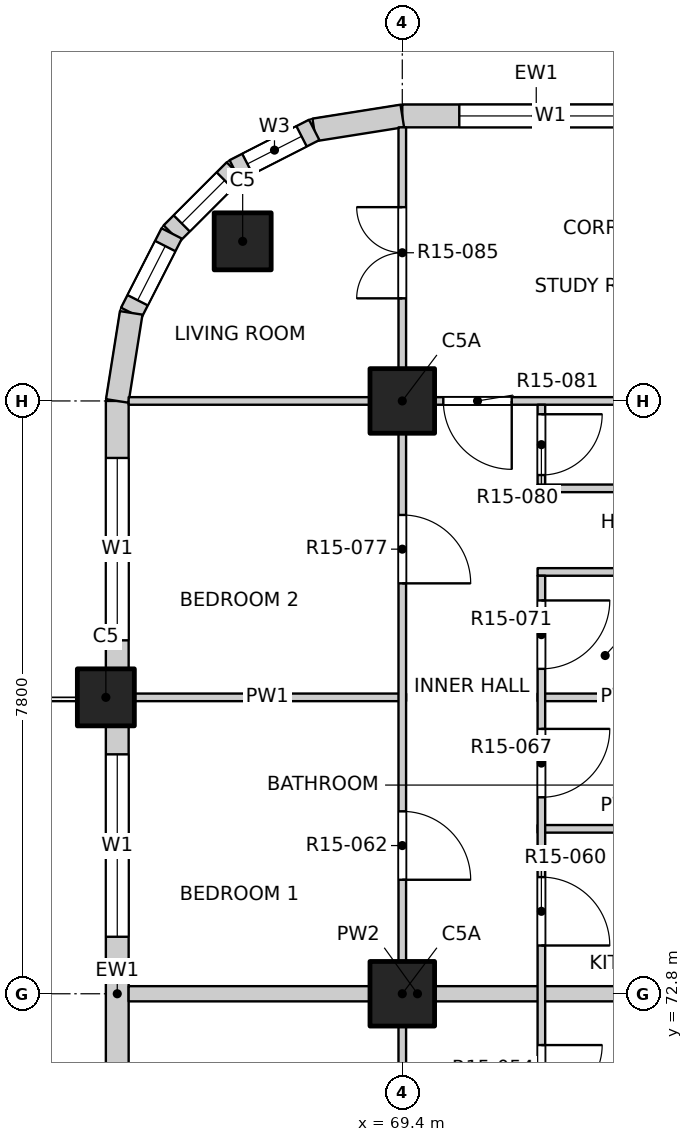
"""IFC4 building model, lengths in metres.
Left out: names, types, materials, properties, quantities, classifications, styles, units other than length and angle.
Written with IfcOpenShell. Run it as: python <this file> out.ifc"""

import sys

from ifc_helpers import new_model, si_unit, direction, frame, frame_2d, origin, origin_2d, place, context, subcontext, project, spatial, rectangle, extrude, element, fill, save


model = new_model("IFC4")
c1 = context("Model", 3, precision=1e-05, world=origin(), true_north=direction((0.0, 1.0)))
c2 = subcontext(c1, "Body", "Model", "MODEL_VIEW")
j1 = project(units=[si_unit("LENGTHUNIT", "METRE"), si_unit("PLANEANGLEUNIT", "RADIAN")], contexts=[c1])
p1 = place(None, origin())
s1 = spatial("IfcSite", under=j1, at=p1, CompositionType="ELEMENT")
p2 = place(p1, origin())
s2 = spatial("IfcBuilding", under=s1, at=p2, CompositionType="ELEMENT")
p3 = place(p2, frame((0.0, 0.0, 158.8)))
s3 = spatial("IfcBuildingStorey", under=s2, at=p3, CompositionType="ELEMENT", Elevation=158.8)
for number, where, z_axis, x_axis in (
    (1, (67.3, 82.7, -0.25), (0.0, 0.0, 1.0), (1.0, 0.0, 0.0)),
    (2, (65.5, 76.7, -0.25), (0.0, 0.0, 1.0), (1.0, 0.0, 0.0)),
):
    element("IfcColumn", number, at=place(p3, frame(where, z_axis=z_axis, x_axis=x_axis)), inside=s3, PredefinedType="COLUMN", context=c2, shape_type="SweptSolid", body=[
        extrude(rectangle(XDim=0.75, YDim=0.75, at=origin_2d()), origin(), (0.0, 0.0, 1.0), 3.4),
    ])
for number, where, z_axis, x_axis in (
    (3, (69.4, 72.8, -0.25), (0.0, 0.0, 1.0), (1.0, 0.0, 0.0)),
    (4, (69.4, 80.6, -0.25), (0.0, 0.0, 1.0), (1.0, 0.0, 0.0)),
):
    element("IfcColumn", number, at=place(p3, frame(where, z_axis=z_axis, x_axis=x_axis)), inside=s3, PredefinedType="COLUMN", context=c2, shape_type="SweptSolid", body=[
        extrude(rectangle(XDim=0.85, YDim=0.85, at=origin_2d()), origin(), (0.0, 0.0, 1.0), 3.4),
    ])
p4 = place(p3, frame((69.4, 84.35, 0.0), z_axis=(0.0, 0.0, 1.0), x_axis=(1.0, 0.0, 0.0)))
e5 = element("IfcWall", 5, at=p4, inside=s3, PredefinedType="SOLIDWALL", context=c2, shape_type="SweptSolid", body=[
    extrude(rectangle(XDim=3.525, YDim=0.3, at=frame_2d((1.763, 0.0))), origin(), (0.0, 0.0, 1.0), 2.7),
])
p5 = place(p4, frame((0.75, 0.0, 0.9)))
e6 = element("IfcOpeningElement", 6, at=p5, cuts=e5, PredefinedType="OPENING", context=c2, shape_type="SweptSolid", body=[
    extrude(rectangle(XDim=2.4, YDim=1.8, at=frame_2d((1.2, 0.9))), frame((0.0, 0.16, 0.0), z_axis=(0.0, -1.0, 0.0), x_axis=(1.0, 0.0, 0.0)), (0.0, 0.0, 1.0), 0.32),
])
p6 = place(p3, frame((65.65, 69.275, 0.0), z_axis=(0.0, 0.0, 1.0), x_axis=(0.0, 1.0, 0.0)))
e7 = element("IfcWall", 7, at=p6, inside=s3, PredefinedType="SOLIDWALL", context=c2, shape_type="SweptSolid", body=[
    extrude(rectangle(XDim=7.05, YDim=0.3, at=frame_2d((3.525, 0.0))), origin(), (0.0, 0.0, 1.0), 2.7),
])
p7 = place(p6, frame((0.675, 0.0, 0.0)))
e8 = element("IfcOpeningElement", 8, at=p7, cuts=e7, PredefinedType="OPENING", context=c2, shape_type="SweptSolid", body=[
    extrude(rectangle(XDim=1.8, YDim=2.4, at=frame_2d((0.9, 1.2))), frame((0.0, 0.16, 0.0), z_axis=(0.0, -1.0, 0.0), x_axis=(1.0, 0.0, 0.0)), (0.0, 0.0, 1.0), 0.32),
])
p8 = place(p6, frame((4.275, 0.0, 0.9)))
e9 = element("IfcOpeningElement", 9, at=p8, cuts=e7, PredefinedType="OPENING", context=c2, shape_type="SweptSolid", body=[
    extrude(rectangle(XDim=2.4, YDim=1.8, at=frame_2d((1.2, 0.9))), frame((0.0, 0.16, 0.0), z_axis=(0.0, -1.0, 0.0), x_axis=(1.0, 0.0, 0.0)), (0.0, 0.0, 1.0), 0.32),
])
p9 = place(p3, frame((65.65, 77.075, 0.0), z_axis=(0.0, 0.0, 1.0), x_axis=(0.0, 1.0, 0.0)))
e10 = element("IfcWall", 10, at=p9, inside=s3, PredefinedType="SOLIDWALL", context=c2, shape_type="SweptSolid", body=[
    extrude(rectangle(XDim=3.525, YDim=0.3, at=frame_2d((1.763, 0.0))), origin(), (0.0, 0.0, 1.0), 2.7),
])
p10 = place(p9, frame((0.375, 0.0, 0.9)))
e11 = element("IfcOpeningElement", 11, at=p10, cuts=e10, PredefinedType="OPENING", context=c2, shape_type="SweptSolid", body=[
    extrude(rectangle(XDim=2.4, YDim=1.8, at=frame_2d((1.2, 0.9))), frame((0.0, 0.16, 0.0), z_axis=(0.0, -1.0, 0.0), x_axis=(1.0, 0.0, 0.0)), (0.0, 0.0, 1.0), 0.32),
])
p11 = place(p3, frame((69.4, 84.35, 0.0), z_axis=(0.0, 0.0, 1.0), x_axis=(-0.987678452879, -0.156496880861, 0.0)))
e12 = element("IfcWall", 12, at=p11, inside=s3, PredefinedType="SOLIDWALL", context=c2, shape_type="SweptSolid", body=[
    extrude(rectangle(XDim=1.173, YDim=0.3, at=frame_2d((0.586, 0.0))), origin(), (0.0, 0.0, 1.0), 2.7),
])
p12 = place(p3, frame((68.241, 84.167, 0.0), z_axis=(0.0, 0.0, 1.0), x_axis=(-0.890988677504, -0.454025524128, 0.0)))
e13 = element("IfcWall", 13, at=p12, inside=s3, PredefinedType="SOLIDWALL", context=c2, shape_type="SweptSolid", body=[
    extrude(rectangle(XDim=1.173, YDim=0.3, at=frame_2d((0.587, 0.0))), origin(), (0.0, 0.0, 1.0), 2.7),
])
p13 = place(p12, frame((0.187, 0.0, 0.9)))
e14 = element("IfcOpeningElement", 14, at=p13, cuts=e13, PredefinedType="OPENING", context=c2, shape_type="SweptSolid", body=[
    extrude(rectangle(XDim=0.8, YDim=1.2, at=frame_2d((0.4, 0.6))), frame((0.0, 0.16, 0.0), z_axis=(0.0, -1.0, 0.0), x_axis=(1.0, 0.0, 0.0)), (0.0, 0.0, 1.0), 0.32),
])
p14 = place(p3, frame((67.196, 83.634, 0.0), z_axis=(0.0, 0.0, 1.0), x_axis=(-0.707106781187, -0.707106781187, 0.0)))
e15 = element("IfcWall", 15, at=p14, inside=s3, PredefinedType="SOLIDWALL", context=c2, shape_type="SweptSolid", body=[
    extrude(rectangle(XDim=1.173, YDim=0.3, at=frame_2d((0.586, 0.0))), origin(), (0.0, 0.0, 1.0), 2.7),
])
p15 = place(p14, frame((0.187, 0.0, 0.9)))
e16 = element("IfcOpeningElement", 16, at=p15, cuts=e15, PredefinedType="OPENING", context=c2, shape_type="SweptSolid", body=[
    extrude(rectangle(XDim=0.8, YDim=1.2, at=frame_2d((0.4, 0.6))), frame((0.0, 0.16, 0.0), z_axis=(0.0, -1.0, 0.0), x_axis=(1.0, 0.0, 0.0)), (0.0, 0.0, 1.0), 0.32),
])
p16 = place(p3, frame((66.366, 82.804, 0.0), z_axis=(0.0, 0.0, 1.0), x_axis=(-0.454025524128, -0.890988677504, 0.0)))
e17 = element("IfcWall", 17, at=p16, inside=s3, PredefinedType="SOLIDWALL", context=c2, shape_type="SweptSolid", body=[
    extrude(rectangle(XDim=1.173, YDim=0.3, at=frame_2d((0.587, 0.0))), origin(), (0.0, 0.0, 1.0), 2.7),
])
p17 = place(p16, frame((0.187, 0.0, 0.9)))
e18 = element("IfcOpeningElement", 18, at=p17, cuts=e17, PredefinedType="OPENING", context=c2, shape_type="SweptSolid", body=[
    extrude(rectangle(XDim=0.8, YDim=1.2, at=frame_2d((0.4, 0.6))), frame((0.0, 0.16, 0.0), z_axis=(0.0, -1.0, 0.0), x_axis=(1.0, 0.0, 0.0)), (0.0, 0.0, 1.0), 0.32),
])
p18 = place(p3, frame((65.833, 81.759, 0.0), z_axis=(0.0, 0.0, 1.0), x_axis=(-0.156496880861, -0.987678452879, 0.0)))
e19 = element("IfcWall", 19, at=p18, inside=s3, PredefinedType="SOLIDWALL", context=c2, shape_type="SweptSolid", body=[
    extrude(rectangle(XDim=1.173, YDim=0.3, at=frame_2d((0.586, 0.0))), origin(), (0.0, 0.0, 1.0), 2.7),
])
p19 = place(p3, frame((65.8, 72.8, 0.0), z_axis=(0.0, 0.0, 1.0), x_axis=(1.0, 0.0, 0.0)))
e20 = element("IfcWall", 20, at=p19, inside=s3, PredefinedType="PARTITIONING", context=c2, shape_type="SweptSolid", body=[
    extrude(rectangle(XDim=7.6, YDim=0.2, at=frame_2d((3.8, 0.0))), origin(), (0.0, 0.0, 1.0), 3.15),
])
p20 = place(p3, frame((71.18, 74.97, 0.0), z_axis=(0.0, 0.0, 1.0), x_axis=(1.0, 0.0, 0.0)))
e21 = element("IfcWall", 21, at=p20, inside=s3, PredefinedType="PARTITIONING", context=c2, shape_type="SweptSolid", body=[
    extrude(rectangle(XDim=2.22, YDim=0.1, at=frame_2d((1.11, 0.0))), origin(), (0.0, 0.0, 1.0), 3.15),
])
p21 = place(p3, frame((65.8, 76.7, 0.0), z_axis=(0.0, 0.0, 1.0), x_axis=(1.0, 0.0, 0.0)))
e22 = element("IfcWall", 22, at=p21, inside=s3, PredefinedType="PARTITIONING", context=c2, shape_type="SweptSolid", body=[
    extrude(rectangle(XDim=3.65, YDim=0.1, at=frame_2d((1.825, 0.0))), origin(), (0.0, 0.0, 1.0), 2.55),
])
p22 = place(p3, frame((71.18, 76.7, 0.0), z_axis=(0.0, 0.0, 1.0), x_axis=(1.0, 0.0, 0.0)))
e23 = element("IfcWall", 23, at=p22, inside=s3, PredefinedType="PARTITIONING", context=c2, shape_type="SweptSolid", body=[
    extrude(rectangle(XDim=2.22, YDim=0.1, at=frame_2d((1.11, 0.0))), origin(), (0.0, 0.0, 1.0), 2.55),
])
for number, where, z_axis, x_axis in (
    (24, (71.18, 78.35, 0.0), (0.0, 0.0, 1.0), (1.0, 0.0, 0.0)),
    (25, (71.18, 79.45, 0.0), (0.0, 0.0, 1.0), (1.0, 0.0, 0.0)),
):
    element("IfcWall", number, at=place(p3, frame(where, z_axis=z_axis, x_axis=x_axis)), inside=s3, PredefinedType="PARTITIONING", context=c2, shape_type="SweptSolid", body=[
        extrude(rectangle(XDim=2.22, YDim=0.1, at=frame_2d((1.11, 0.0))), origin(), (0.0, 0.0, 1.0), 3.15),
    ])
p23 = place(p3, frame((65.8, 80.6, 0.0), z_axis=(0.0, 0.0, 1.0), x_axis=(1.0, 0.0, 0.0)))
e26 = element("IfcWall", 26, at=p23, inside=s3, PredefinedType="PARTITIONING", context=c2, shape_type="SweptSolid", body=[
    extrude(rectangle(XDim=7.6, YDim=0.1, at=frame_2d((3.8, 0.0))), origin(), (0.0, 0.0, 1.0), 3.15),
])
p24 = place(p23, frame((4.14, 0.0, 0.0)))
e27 = element("IfcOpeningElement", 27, at=p24, cuts=e26, PredefinedType="OPENING", context=c2, shape_type="SweptSolid", body=[
    extrude(rectangle(XDim=0.9, YDim=2.1, at=frame_2d((0.45, 1.05))), frame((0.0, 0.06, 0.0), z_axis=(0.0, -1.0, 0.0), x_axis=(1.0, 0.0, 0.0)), (0.0, 0.0, 1.0), 0.12),
])
p25 = place(p3, frame((69.4, 45.8, 0.0), z_axis=(0.0, 0.0, 1.0), x_axis=(0.0, 1.0, 0.0)))
e28 = element("IfcWall", 28, at=p25, inside=s3, PredefinedType="PARTITIONING", context=c2, shape_type="SweptSolid", body=[
    extrude(rectangle(XDim=38.4, YDim=0.1, at=frame_2d((19.2, 0.0))), origin(), (0.0, 0.0, 1.0), 3.15),
])
p26 = place(p25, frame((1.05, 0.0, 0.0)))
e29 = element("IfcOpeningElement", 29, at=p26, cuts=e28, PredefinedType="OPENING", context=c2, shape_type="SweptSolid", body=[
    extrude(rectangle(XDim=1.2, YDim=2.1, at=frame_2d((0.6, 1.05))), frame((0.0, 0.06, 0.0), z_axis=(0.0, -1.0, 0.0), x_axis=(1.0, 0.0, 0.0)), (0.0, 0.0, 1.0), 0.12),
])
p27 = place(p25, frame((5.1, 0.0, 0.0)))
e30 = element("IfcOpeningElement", 30, at=p27, cuts=e28, PredefinedType="OPENING", context=c2, shape_type="SweptSolid", body=[
    extrude(rectangle(XDim=0.9, YDim=2.1, at=frame_2d((0.45, 1.05))), frame((0.0, 0.06, 0.0), z_axis=(0.0, -1.0, 0.0), x_axis=(1.0, 0.0, 0.0)), (0.0, 0.0, 1.0), 0.12),
])
p28 = place(p25, frame((11.925, 0.0, 0.0)))
e31 = element("IfcOpeningElement", 31, at=p28, cuts=e28, PredefinedType="OPENING", context=c2, shape_type="SweptSolid", body=[
    extrude(rectangle(XDim=1.2, YDim=2.1, at=frame_2d((0.6, 1.05))), frame((0.0, 0.06, 0.0), z_axis=(0.0, -1.0, 0.0), x_axis=(1.0, 0.0, 0.0)), (0.0, 0.0, 1.0), 0.12),
])
p29 = place(p25, frame((16.8, 0.0, 0.0)))
e32 = element("IfcOpeningElement", 32, at=p29, cuts=e28, PredefinedType="OPENING", context=c2, shape_type="SweptSolid", body=[
    extrude(rectangle(XDim=0.9, YDim=2.1, at=frame_2d((0.45, 1.05))), frame((0.0, 0.06, 0.0), z_axis=(0.0, -1.0, 0.0), x_axis=(1.0, 0.0, 0.0)), (0.0, 0.0, 1.0), 0.12),
])
p30 = place(p25, frame((22.5, 0.0, 0.0)))
e33 = element("IfcOpeningElement", 33, at=p30, cuts=e28, PredefinedType="OPENING", context=c2, shape_type="SweptSolid", body=[
    extrude(rectangle(XDim=1.2, YDim=2.1, at=frame_2d((0.6, 1.05))), frame((0.0, 0.06, 0.0), z_axis=(0.0, -1.0, 0.0), x_axis=(1.0, 0.0, 0.0)), (0.0, 0.0, 1.0), 0.12),
])
p31 = place(p25, frame((28.5, 0.0, 0.0)))
e34 = element("IfcOpeningElement", 34, at=p31, cuts=e28, PredefinedType="OPENING", context=c2, shape_type="SweptSolid", body=[
    extrude(rectangle(XDim=0.9, YDim=2.1, at=frame_2d((0.45, 1.05))), frame((0.0, 0.06, 0.0), z_axis=(0.0, -1.0, 0.0), x_axis=(1.0, 0.0, 0.0)), (0.0, 0.0, 1.0), 0.12),
])
p32 = place(p25, frame((32.4, 0.0, 0.0)))
e35 = element("IfcOpeningElement", 35, at=p32, cuts=e28, PredefinedType="OPENING", context=c2, shape_type="SweptSolid", body=[
    extrude(rectangle(XDim=0.9, YDim=2.1, at=frame_2d((0.45, 1.05))), frame((0.0, 0.06, 0.0), z_axis=(0.0, -1.0, 0.0), x_axis=(1.0, 0.0, 0.0)), (0.0, 0.0, 1.0), 0.12),
])
p33 = place(p25, frame((36.15, 0.0, 0.0)))
e36 = element("IfcOpeningElement", 36, at=p33, cuts=e28, PredefinedType="OPENING", context=c2, shape_type="SweptSolid", body=[
    extrude(rectangle(XDim=1.2, YDim=2.1, at=frame_2d((0.6, 1.05))), frame((0.0, 0.06, 0.0), z_axis=(0.0, -1.0, 0.0), x_axis=(1.0, 0.0, 0.0)), (0.0, 0.0, 1.0), 0.12),
])
p34 = place(p3, frame((71.23, 68.45, 0.0), z_axis=(0.0, 0.0, 1.0), x_axis=(0.0, 1.0, 0.0)))
e37 = element("IfcWall", 37, at=p34, inside=s3, PredefinedType="PARTITIONING", context=c2, shape_type="SweptSolid", body=[
    extrude(rectangle(XDim=9.85, YDim=0.1, at=frame_2d((4.925, 0.0))), origin(), (0.0, 0.0, 1.0), 3.15),
])
p35 = place(p34, frame((0.625, 0.0, 0.0)))
e38 = element("IfcOpeningElement", 38, at=p35, cuts=e37, PredefinedType="OPENING", context=c2, shape_type="SweptSolid", body=[
    extrude(rectangle(XDim=0.9, YDim=2.1, at=frame_2d((0.45, 1.05))), frame((0.0, 0.06, 0.0), z_axis=(0.0, -1.0, 0.0), x_axis=(1.0, 0.0, 0.0)), (0.0, 0.0, 1.0), 0.12),
])
p36 = place(p34, frame((2.875, 0.0, 0.0)))
e39 = element("IfcOpeningElement", 39, at=p36, cuts=e37, PredefinedType="OPENING", context=c2, shape_type="SweptSolid", body=[
    extrude(rectangle(XDim=0.8, YDim=2.1, at=frame_2d((0.4, 1.05))), frame((0.0, 0.06, 0.0), z_axis=(0.0, -1.0, 0.0), x_axis=(1.0, 0.0, 0.0)), (0.0, 0.0, 1.0), 0.12),
])
p37 = place(p34, frame((4.985, 0.0, 0.0)))
e40 = element("IfcOpeningElement", 40, at=p37, cuts=e37, PredefinedType="OPENING", context=c2, shape_type="SweptSolid", body=[
    extrude(rectangle(XDim=0.9, YDim=2.1, at=frame_2d((0.45, 1.05))), frame((0.0, 0.06, 0.0), z_axis=(0.0, -1.0, 0.0), x_axis=(1.0, 0.0, 0.0)), (0.0, 0.0, 1.0), 0.12),
])
p38 = place(p34, frame((6.935, 0.0, 0.0)))
e41 = element("IfcOpeningElement", 41, at=p38, cuts=e37, PredefinedType="OPENING", context=c2, shape_type="SweptSolid", body=[
    extrude(rectangle(XDim=0.9, YDim=2.1, at=frame_2d((0.45, 1.05))), frame((0.0, 0.06, 0.0), z_axis=(0.0, -1.0, 0.0), x_axis=(1.0, 0.0, 0.0)), (0.0, 0.0, 1.0), 0.12),
])
p39 = place(p34, frame((8.625, 0.0, 0.0)))
e42 = element("IfcOpeningElement", 42, at=p39, cuts=e37, PredefinedType="OPENING", context=c2, shape_type="SweptSolid", body=[
    extrude(rectangle(XDim=0.9, YDim=2.1, at=frame_2d((0.45, 1.05))), frame((0.0, 0.06, 0.0), z_axis=(0.0, -1.0, 0.0), x_axis=(1.0, 0.0, 0.0)), (0.0, 0.0, 1.0), 0.12),
])
p40 = place(p3, frame((71.23, 79.5, 0.0), z_axis=(0.0, 0.0, 1.0), x_axis=(0.0, 1.0, 0.0)))
e43 = element("IfcWall", 43, at=p40, inside=s3, PredefinedType="PARTITIONING", context=c2, shape_type="SweptSolid", body=[
    extrude(rectangle(XDim=1.05, YDim=0.1, at=frame_2d((0.525, 0.0))), origin(), (0.0, 0.0, 1.0), 3.15),
])
p41 = place(p40, frame((0.125, 0.0, 0.0)))
e44 = element("IfcOpeningElement", 44, at=p41, cuts=e43, PredefinedType="OPENING", context=c2, shape_type="SweptSolid", body=[
    extrude(rectangle(XDim=0.8, YDim=2.1, at=frame_2d((0.4, 1.05))), frame((0.0, 0.06, 0.0), z_axis=(0.0, -1.0, 0.0), x_axis=(1.0, 0.0, 0.0)), (0.0, 0.0, 1.0), 0.12),
])
p42 = place(p5, origin())
e45 = element("IfcWindow", 45, at=p42, inside=s3, PartitioningType="DOUBLE_PANEL_VERTICAL", PredefinedType="WINDOW", context=c2, shape_type="SweptSolid", body=[
    extrude(rectangle(XDim=2.4, YDim=1.8, at=frame_2d((1.2, 0.9))), frame((0.0, 0.03, 0.0), z_axis=(0.0, -1.0, 0.0), x_axis=(1.0, 0.0, 0.0)), (0.0, 0.0, 1.0), 0.06),
])
fill(e6, e45)
p43 = place(p8, origin())
e46 = element("IfcWindow", 46, at=p43, inside=s3, PartitioningType="DOUBLE_PANEL_VERTICAL", PredefinedType="WINDOW", context=c2, shape_type="SweptSolid", body=[
    extrude(rectangle(XDim=2.4, YDim=1.8, at=frame_2d((1.2, 0.9))), frame((0.0, 0.03, 0.0), z_axis=(0.0, -1.0, 0.0), x_axis=(1.0, 0.0, 0.0)), (0.0, 0.0, 1.0), 0.06),
])
fill(e9, e46)
p44 = place(p10, origin())
e47 = element("IfcWindow", 47, at=p44, inside=s3, PartitioningType="DOUBLE_PANEL_VERTICAL", PredefinedType="WINDOW", context=c2, shape_type="SweptSolid", body=[
    extrude(rectangle(XDim=2.4, YDim=1.8, at=frame_2d((1.2, 0.9))), frame((0.0, 0.03, 0.0), z_axis=(0.0, -1.0, 0.0), x_axis=(1.0, 0.0, 0.0)), (0.0, 0.0, 1.0), 0.06),
])
fill(e11, e47)
p45 = place(p13, origin())
e48 = element("IfcWindow", 48, at=p45, inside=s3, PartitioningType="SINGLE_PANEL", PredefinedType="WINDOW", context=c2, shape_type="SweptSolid", body=[
    extrude(rectangle(XDim=0.8, YDim=1.2, at=frame_2d((0.4, 0.6))), frame((0.0, 0.03, 0.0), z_axis=(0.0, -1.0, 0.0), x_axis=(1.0, 0.0, 0.0)), (0.0, 0.0, 1.0), 0.06),
])
fill(e14, e48)
p46 = place(p15, origin())
e49 = element("IfcWindow", 49, at=p46, inside=s3, PartitioningType="SINGLE_PANEL", PredefinedType="WINDOW", context=c2, shape_type="SweptSolid", body=[
    extrude(rectangle(XDim=0.8, YDim=1.2, at=frame_2d((0.4, 0.6))), frame((0.0, 0.03, 0.0), z_axis=(0.0, -1.0, 0.0), x_axis=(1.0, 0.0, 0.0)), (0.0, 0.0, 1.0), 0.06),
])
fill(e16, e49)
p47 = place(p17, origin())
e50 = element("IfcWindow", 50, at=p47, inside=s3, PartitioningType="SINGLE_PANEL", PredefinedType="WINDOW", context=c2, shape_type="SweptSolid", body=[
    extrude(rectangle(XDim=0.8, YDim=1.2, at=frame_2d((0.4, 0.6))), frame((0.0, 0.03, 0.0), z_axis=(0.0, -1.0, 0.0), x_axis=(1.0, 0.0, 0.0)), (0.0, 0.0, 1.0), 0.06),
])
fill(e18, e50)
p48 = place(p36, origin())
e51 = element("IfcDoor", 51, at=p48, inside=s3, OperationType="SINGLE_SWING_LEFT", PredefinedType="DOOR", context=c2, shape_type="SweptSolid", body=[
    extrude(rectangle(XDim=0.8, YDim=2.1, at=frame_2d((0.4, 1.05))), frame((0.0, 0.025, 0.0), z_axis=(0.0, -1.0, 0.0), x_axis=(1.0, 0.0, 0.0)), (0.0, 0.0, 1.0), 0.05),
])
fill(e39, e51)
p49 = place(p37, origin())
e52 = element("IfcDoor", 52, at=p49, inside=s3, OperationType="SINGLE_SWING_RIGHT", PredefinedType="DOOR", context=c2, shape_type="SweptSolid", body=[
    extrude(rectangle(XDim=0.9, YDim=2.1, at=frame_2d((0.45, 1.05))), frame((0.0, 0.025, 0.0), z_axis=(0.0, -1.0, 0.0), x_axis=(1.0, 0.0, 0.0)), (0.0, 0.0, 1.0), 0.05),
])
fill(e40, e52)
p50 = place(p31, origin())
e53 = element("IfcDoor", 53, at=p50, inside=s3, OperationType="SINGLE_SWING_RIGHT", PredefinedType="DOOR", context=c2, shape_type="SweptSolid", body=[
    extrude(rectangle(XDim=0.9, YDim=2.1, at=frame_2d((0.45, 1.05))), frame((0.0, 0.025, 0.0), z_axis=(0.0, -1.0, 0.0), x_axis=(1.0, 0.0, 0.0)), (0.0, 0.0, 1.0), 0.05),
])
fill(e34, e53)
p51 = place(p38, origin())
e54 = element("IfcDoor", 54, at=p51, inside=s3, OperationType="SINGLE_SWING_LEFT", PredefinedType="DOOR", context=c2, shape_type="SweptSolid", body=[
    extrude(rectangle(XDim=0.9, YDim=2.1, at=frame_2d((0.45, 1.05))), frame((0.0, 0.025, 0.0), z_axis=(0.0, -1.0, 0.0), x_axis=(1.0, 0.0, 0.0)), (0.0, 0.0, 1.0), 0.05),
])
fill(e41, e54)
p52 = place(p39, origin())
e55 = element("IfcDoor", 55, at=p52, inside=s3, OperationType="SINGLE_SWING_LEFT", PredefinedType="DOOR", context=c2, shape_type="SweptSolid", body=[
    extrude(rectangle(XDim=0.9, YDim=2.1, at=frame_2d((0.45, 1.05))), frame((0.0, 0.025, 0.0), z_axis=(0.0, -1.0, 0.0), x_axis=(1.0, 0.0, 0.0)), (0.0, 0.0, 1.0), 0.05),
])
fill(e42, e55)
p53 = place(p32, origin())
e56 = element("IfcDoor", 56, at=p53, inside=s3, OperationType="SINGLE_SWING_RIGHT", PredefinedType="DOOR", context=c2, shape_type="SweptSolid", body=[
    extrude(rectangle(XDim=0.9, YDim=2.1, at=frame_2d((0.45, 1.05))), frame((0.0, 0.025, 0.0), z_axis=(0.0, -1.0, 0.0), x_axis=(1.0, 0.0, 0.0)), (0.0, 0.0, 1.0), 0.05),
])
fill(e35, e56)
p54 = place(p41, origin())
e57 = element("IfcDoor", 57, at=p54, inside=s3, OperationType="SINGLE_SWING_LEFT", PredefinedType="DOOR", context=c2, shape_type="SweptSolid", body=[
    extrude(rectangle(XDim=0.8, YDim=2.1, at=frame_2d((0.4, 1.05))), frame((0.0, 0.025, 0.0), z_axis=(0.0, -1.0, 0.0), x_axis=(1.0, 0.0, 0.0)), (0.0, 0.0, 1.0), 0.05),
])
fill(e44, e57)
p55 = place(p24, origin())
e58 = element("IfcDoor", 58, at=p55, inside=s3, OperationType="SINGLE_SWING_LEFT", PredefinedType="DOOR", context=c2, shape_type="SweptSolid", body=[
    extrude(rectangle(XDim=0.9, YDim=2.1, at=frame_2d((0.45, 1.05))), frame((0.0, 0.025, 0.0), z_axis=(0.0, -1.0, 0.0), x_axis=(1.0, 0.0, 0.0)), (0.0, 0.0, 1.0), 0.05),
])
fill(e27, e58)
p56 = place(p33, origin())
e59 = element("IfcDoor", 59, at=p56, inside=s3, OperationType="DOUBLE_DOOR_SINGLE_SWING", PredefinedType="DOOR", context=c2, shape_type="SweptSolid", body=[
    extrude(rectangle(XDim=1.2, YDim=2.1, at=frame_2d((0.6, 1.05))), frame((0.0, 0.025, 0.0), z_axis=(0.0, -1.0, 0.0), x_axis=(1.0, 0.0, 0.0)), (0.0, 0.0, 1.0), 0.05),
])
fill(e36, e59)
save(model, sys.argv[1])
